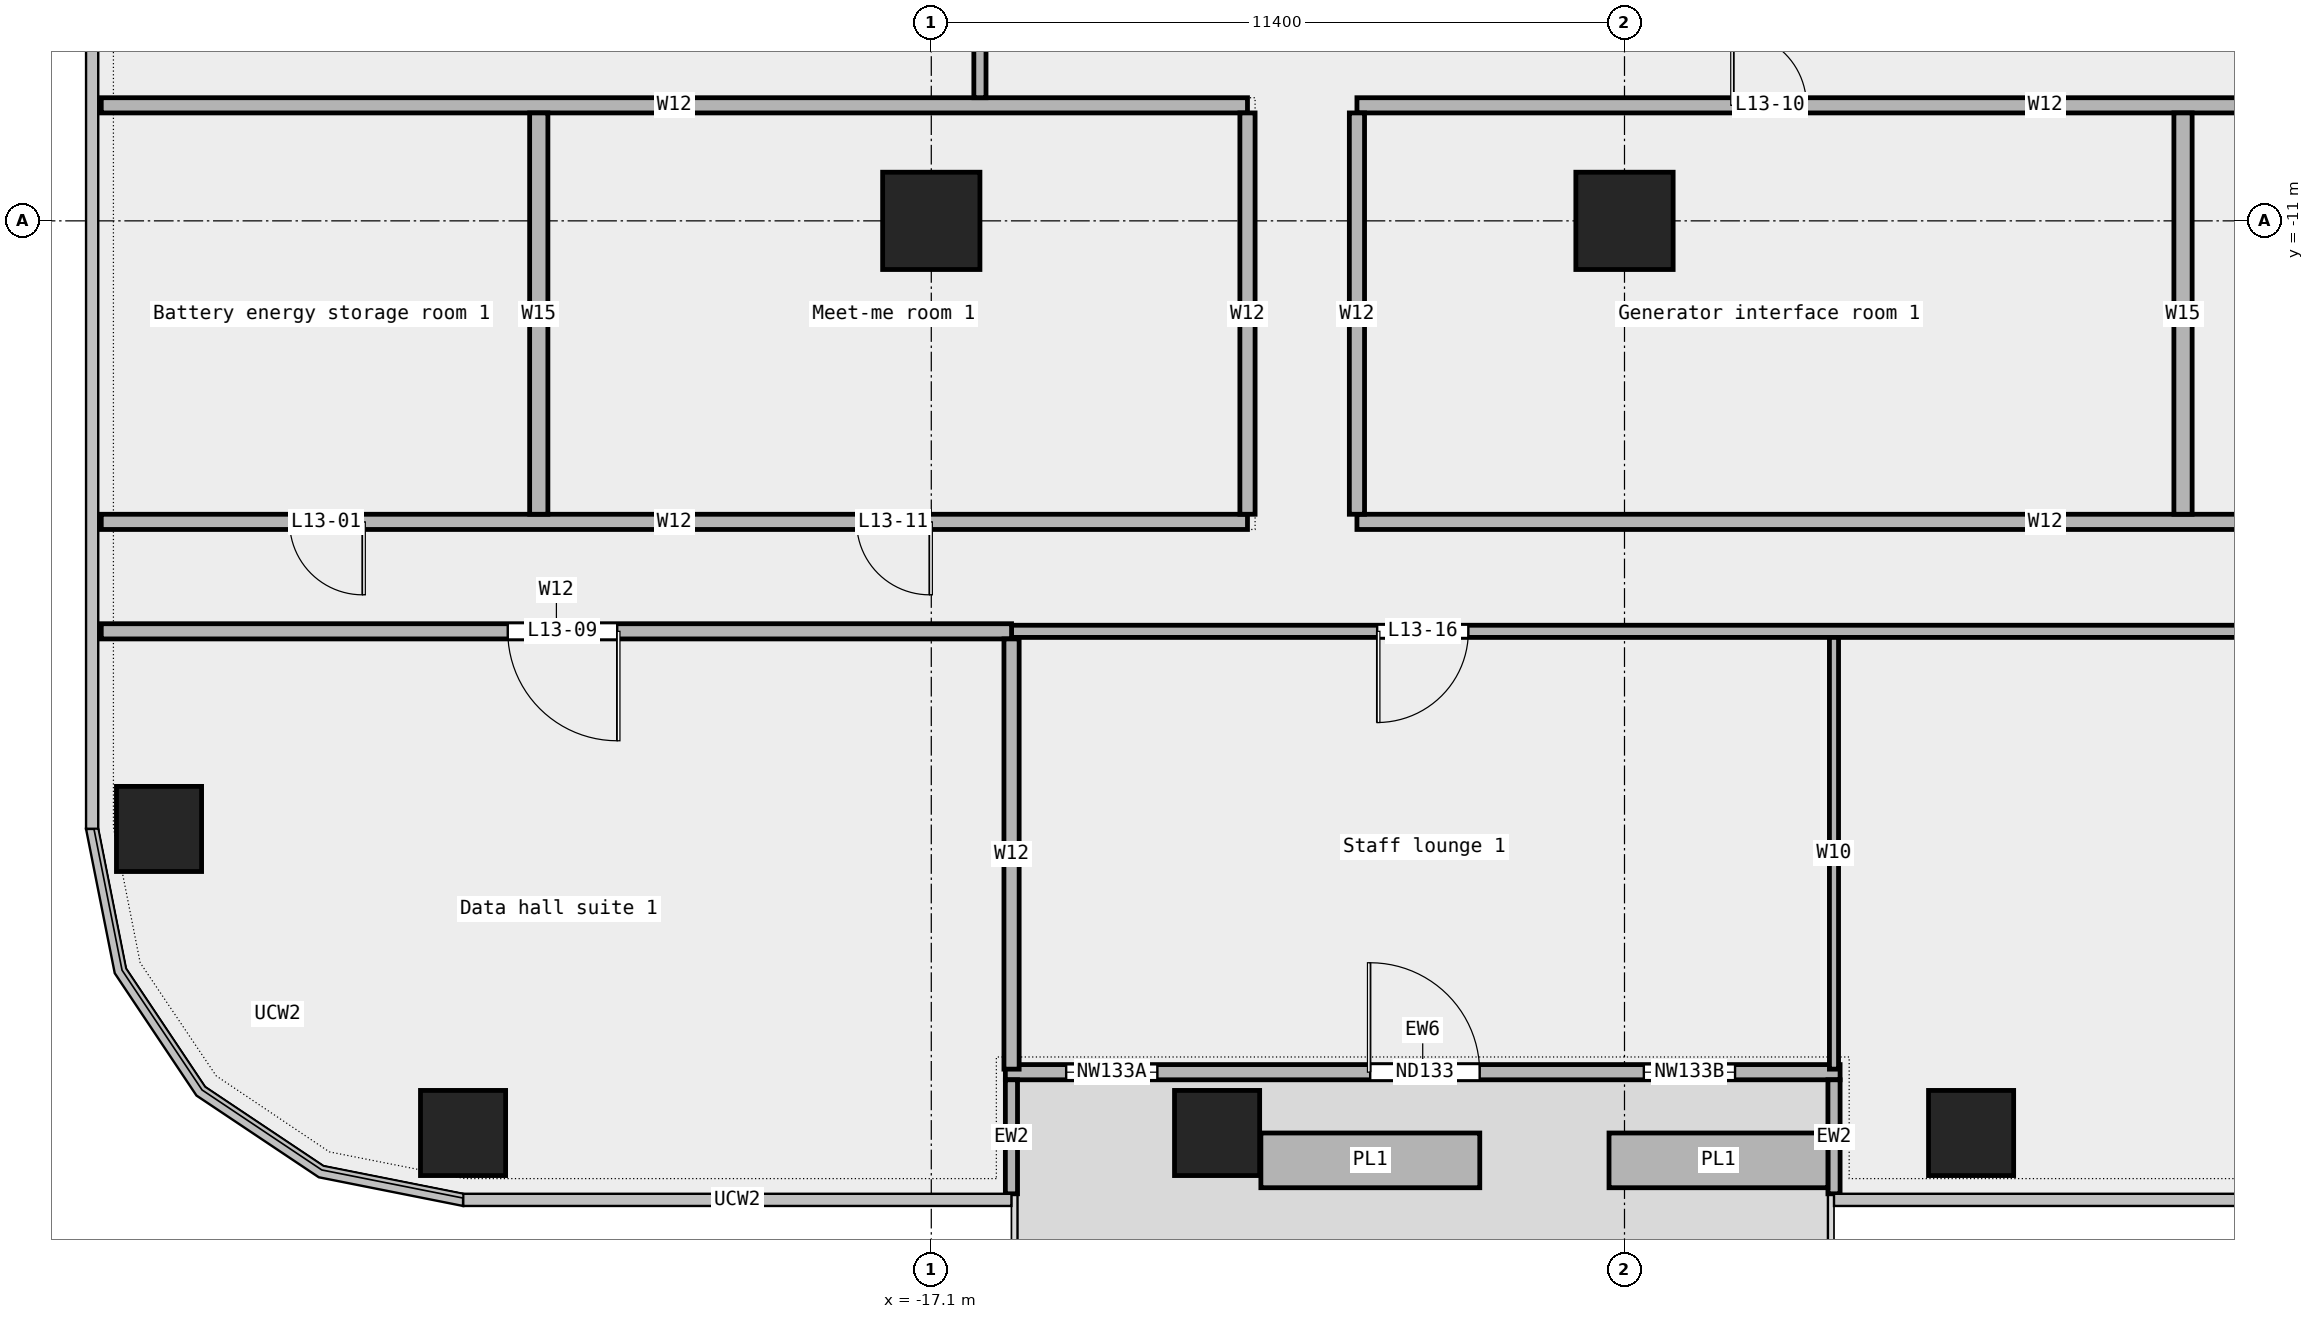
"""IFC4 building model, lengths in metres.
Left out: names, types, materials, properties, quantities, classifications, styles, units other than length and angle.
Written with IfcOpenShell. Run it as: python <this file> out.ifc"""

import sys

from ifc_helpers import new_model, si_unit, direction, frame, frame_2d, origin, origin_2d, place, context, subcontext, project, spatial, rectangle, extrude, element, fill, save


model = new_model("IFC4")
c1 = context("Model", 3, precision=1e-05, world=origin(), true_north=direction((0.0, 1.0)))
c2 = subcontext(c1, "Body", "Model", "MODEL_VIEW")
j1 = project(units=[si_unit("LENGTHUNIT", "METRE"), si_unit("PLANEANGLEUNIT", "RADIAN")], contexts=[c1])
p1 = place(None, origin())
s1 = spatial("IfcSite", under=j1, at=p1, CompositionType="ELEMENT")
p2 = place(p1, origin())
s2 = spatial("IfcBuilding", under=s1, at=p2, CompositionType="ELEMENT")
p3 = place(p2, frame((0.0, 0.0, 69.4)))
s3 = spatial("IfcBuildingStorey", under=s2, at=p3, CompositionType="ELEMENT", Elevation=69.4)
for number, where, z_axis, x_axis in (
    (1, (-24.8, -26.0, 0.0), (0.0, 0.0, 1.0), (1.0, 0.0, 0.0)),
    (2, (-12.4, -26.0, 0.0), (0.0, 0.0, 1.0), (1.0, 0.0, 0.0)),
    (3, (0.0, -26.0, 0.0), (0.0, 0.0, 1.0), (1.0, 0.0, 0.0)),
    (4, (-29.8, -21.0, 0.0), (0.0, 0.0, 1.0), (1.0, 0.0, 0.0)),
):
    element("IfcColumn", number, at=place(p3, frame(where, z_axis=z_axis, x_axis=x_axis)), inside=s3, PredefinedType="COLUMN", context=c2, shape_type="SweptSolid", body=[
        extrude(rectangle(XDim=1.4, YDim=1.4, at=origin_2d()), origin(), (0.0, 0.0, 1.0), 4.35),
    ])
for number, where, z_axis, x_axis in (
    (5, (-17.1, -11.0, 0.0), (0.0, 0.0, 1.0), (1.0, 0.0, 0.0)),
    (6, (-5.7, -11.0, 0.0), (0.0, 0.0, 1.0), (1.0, 0.0, 0.0)),
):
    element("IfcColumn", number, at=place(p3, frame(where, z_axis=z_axis, x_axis=x_axis)), inside=s3, PredefinedType="COLUMN", context=c2, shape_type="SweptSolid", body=[
        extrude(rectangle(XDim=1.6, YDim=1.6, at=origin_2d()), origin(), (0.0, 0.0, 1.0), 4.35),
    ])
p4 = place(p3, frame((-15.882, -25.0, 0.0), z_axis=(0.0, 0.0, 1.0), x_axis=(1.0, 0.0, 0.0)))
e7 = element("IfcWall", 7, at=p4, inside=s3, PredefinedType="STANDARD", context=c2, shape_type="SweptSolid", body=[
    extrude(rectangle(XDim=13.727, YDim=0.25, at=frame_2d((6.864, 0.0))), origin(), (0.0, 0.0, 1.0), 4.35),
])
p5 = place(p4, frame((1.0, 0.0, 0.45)))
e8 = element("IfcOpeningElement", 8, at=p5, cuts=e7, PredefinedType="OPENING", context=c2, shape_type="SweptSolid", body=[
    extrude(rectangle(XDim=1.5, YDim=3.0, at=frame_2d((0.75, 1.5))), frame((0.0, 0.137, 0.0), z_axis=(0.0, -1.0, 0.0), x_axis=(1.0, 0.0, 0.0)), (0.0, 0.0, 1.0), 0.274),
])
p6 = place(p4, frame((6.0, 0.0, 0.0)))
e9 = element("IfcOpeningElement", 9, at=p6, cuts=e7, PredefinedType="OPENING", context=c2, shape_type="SweptSolid", body=[
    extrude(rectangle(XDim=1.8, YDim=2.4, at=frame_2d((0.9, 1.2))), frame((0.0, 0.137, 0.0), z_axis=(0.0, -1.0, 0.0), x_axis=(1.0, 0.0, 0.0)), (0.0, 0.0, 1.0), 0.274),
])
p7 = place(p4, frame((10.5, 0.0, 0.45)))
e10 = element("IfcOpeningElement", 10, at=p7, cuts=e7, PredefinedType="OPENING", context=c2, shape_type="SweptSolid", body=[
    extrude(rectangle(XDim=1.5, YDim=3.0, at=frame_2d((0.75, 1.5))), frame((0.0, 0.137, 0.0), z_axis=(0.0, -1.0, 0.0), x_axis=(1.0, 0.0, 0.0)), (0.0, 0.0, 1.0), 0.274),
])
for number, where, z_axis, x_axis in (
    (11, (-15.782, -27.0, 0.0), (0.0, 0.0, 1.0), (0.0, 1.0, 0.0)),
    (12, (-2.255, -27.0, 0.0), (0.0, 0.0, 1.0), (0.0, 1.0, 0.0)),
):
    element("IfcWall", number, at=place(p3, frame(where, z_axis=z_axis, x_axis=x_axis)), inside=s3, PredefinedType="STANDARD", context=c2, shape_type="SweptSolid", body=[
        extrude(rectangle(XDim=1.875, YDim=0.2, at=frame_2d((0.938, 0.0))), origin(), (0.0, 0.0, 1.0), 4.35),
    ])
for number, where, z_axis, x_axis in (
    (13, (-11.68, -26.45, 0.0), (0.0, 0.0, 1.0), (1.0, 0.0, 0.0)),
    (14, (-5.955, -26.45, 0.0), (0.0, 0.0, 1.0), (1.0, 0.0, 0.0)),
):
    element("IfcWall", number, at=place(p3, frame(where, z_axis=z_axis, x_axis=x_axis)), inside=s3, PredefinedType="STANDARD", context=c2, shape_type="SweptSolid", body=[
        extrude(rectangle(XDim=3.6, YDim=0.9, at=frame_2d((1.8, 0.0))), origin(), (0.0, 0.0, 1.0), 0.7),
    ])
p8 = place(p3, frame((-15.78, -17.75, 0.0), z_axis=(0.0, 0.0, 1.0), x_axis=(1.0, 0.0, 0.0)))
e15 = element("IfcWall", 15, at=p8, inside=s3, PredefinedType="PARTITIONING", context=c2, shape_type="SweptSolid", body=[
    extrude(rectangle(XDim=46.53, YDim=0.2, at=frame_2d((23.265, 0.0))), origin(), (0.0, 0.0, 1.0), 4.35),
])
p9 = place(p8, frame((29.028, 0.0, 0.0)))
e16 = element("IfcOpeningElement", 16, at=p9, cuts=e15, PredefinedType="OPENING", context=c2, shape_type="SweptSolid", body=[
    extrude(rectangle(XDim=1.8, YDim=2.1, at=frame_2d((0.9, 1.05))), frame((0.0, 0.112, 0.0), z_axis=(0.0, -1.0, 0.0), x_axis=(1.0, 0.0, 0.0)), (0.0, 0.0, 1.0), 0.224),
])
p10 = place(p8, frame((6.012, 0.0, 0.0)))
e17 = element("IfcOpeningElement", 17, at=p10, cuts=e15, PredefinedType="OPENING", context=c2, shape_type="SweptSolid", body=[
    extrude(rectangle(XDim=1.5, YDim=2.1, at=frame_2d((0.75, 1.05))), frame((0.0, 0.112, 0.0), z_axis=(0.0, -1.0, 0.0), x_axis=(1.0, 0.0, 0.0)), (0.0, 0.0, 1.0), 0.224),
])
p11 = place(p3, frame((-30.75, -17.75, 0.0), z_axis=(0.0, 0.0, 1.0), x_axis=(1.0, 0.0, 0.0)))
e18 = element("IfcWall", 18, at=p11, inside=s3, PredefinedType="PARTITIONING", context=c2, shape_type="SweptSolid", body=[
    extrude(rectangle(XDim=14.97, YDim=0.25, at=frame_2d((7.485, 0.0))), origin(), (0.0, 0.0, 1.0), 4.35),
])
p12 = place(p11, frame((6.685, 0.0, 0.0)))
e19 = element("IfcOpeningElement", 19, at=p12, cuts=e18, PredefinedType="OPENING", context=c2, shape_type="SweptSolid", body=[
    extrude(rectangle(XDim=1.8, YDim=2.1, at=frame_2d((0.9, 1.05))), frame((0.0, 0.137, 0.0), z_axis=(0.0, -1.0, 0.0), x_axis=(1.0, 0.0, 0.0)), (0.0, 0.0, 1.0), 0.274),
])
p13 = place(p3, frame((-30.75, -15.95, 0.0), z_axis=(0.0, 0.0, 1.0), x_axis=(1.0, 0.0, 0.0)))
e20 = element("IfcWall", 20, at=p13, inside=s3, PredefinedType="PARTITIONING", context=c2, shape_type="SweptSolid", body=[
    extrude(rectangle(XDim=18.85, YDim=0.25, at=frame_2d((9.425, 0.0))), origin(), (0.0, 0.0, 1.0), 4.35),
])
p14 = place(p13, frame((3.097, 0.0, 0.0)))
e21 = element("IfcOpeningElement", 21, at=p14, cuts=e20, PredefinedType="OPENING", context=c2, shape_type="SweptSolid", body=[
    extrude(rectangle(XDim=1.2, YDim=2.1, at=frame_2d((0.6, 1.05))), frame((0.0, 0.137, 0.0), z_axis=(0.0, -1.0, 0.0), x_axis=(1.0, 0.0, 0.0)), (0.0, 0.0, 1.0), 0.274),
])
p15 = place(p13, frame((12.423, 0.0, 0.0)))
e22 = element("IfcOpeningElement", 22, at=p15, cuts=e20, PredefinedType="OPENING", context=c2, shape_type="SweptSolid", body=[
    extrude(rectangle(XDim=1.2, YDim=2.1, at=frame_2d((0.6, 1.05))), frame((0.0, 0.137, 0.0), z_axis=(0.0, -1.0, 0.0), x_axis=(1.0, 0.0, 0.0)), (0.0, 0.0, 1.0), 0.274),
])
p16 = place(p3, frame((-10.1, -15.95, 0.0), z_axis=(0.0, 0.0, 1.0), x_axis=(1.0, 0.0, 0.0)))
e23 = element("IfcWall", 23, at=p16, inside=s3, PredefinedType="PARTITIONING", context=c2, shape_type="SweptSolid", body=[
    extrude(rectangle(XDim=22.64, YDim=0.25, at=frame_2d((11.32, 0.0))), origin(), (0.0, 0.0, 1.0), 4.35),
])
p17 = place(p3, frame((-30.75, -9.1, 0.0), z_axis=(0.0, 0.0, 1.0), x_axis=(1.0, 0.0, 0.0)))
e24 = element("IfcWall", 24, at=p17, inside=s3, PredefinedType="PARTITIONING", context=c2, shape_type="SweptSolid", body=[
    extrude(rectangle(XDim=18.85, YDim=0.25, at=frame_2d((9.425, 0.0))), origin(), (0.0, 0.0, 1.0), 4.35),
])
p18 = place(p3, frame((-10.1, -9.1, 0.0), z_axis=(0.0, 0.0, 1.0), x_axis=(1.0, 0.0, 0.0)))
e25 = element("IfcWall", 25, at=p18, inside=s3, PredefinedType="PARTITIONING", context=c2, shape_type="SweptSolid", body=[
    extrude(rectangle(XDim=22.64, YDim=0.25, at=frame_2d((11.32, 0.0))), origin(), (0.0, 0.0, 1.0), 4.35),
])
p19 = place(p18, frame((17.512, 0.0, 0.0)))
e26 = element("IfcOpeningElement", 26, at=p19, cuts=e25, PredefinedType="OPENING", context=c2, shape_type="SweptSolid", body=[
    extrude(rectangle(XDim=1.2, YDim=2.1, at=frame_2d((0.6, 1.05))), frame((0.0, 0.137, 0.0), z_axis=(0.0, -1.0, 0.0), x_axis=(1.0, 0.0, 0.0)), (0.0, 0.0, 1.0), 0.274),
])
p20 = place(p18, frame((6.192, 0.0, 0.0)))
e27 = element("IfcOpeningElement", 27, at=p20, cuts=e25, PredefinedType="OPENING", context=c2, shape_type="SweptSolid", body=[
    extrude(rectangle(XDim=1.2, YDim=2.1, at=frame_2d((0.6, 1.05))), frame((0.0, 0.137, 0.0), z_axis=(0.0, -1.0, 0.0), x_axis=(1.0, 0.0, 0.0)), (0.0, 0.0, 1.0), 0.274),
])
p21 = place(p3, frame((-23.555, -15.825, 0.0), z_axis=(0.0, 0.0, 1.0), x_axis=(0.0, 1.0, 0.0)))
e28 = element("IfcWall", 28, at=p21, inside=s3, PredefinedType="PARTITIONING", context=c2, shape_type="SweptSolid", body=[
    extrude(rectangle(XDim=6.6, YDim=0.3, at=frame_2d((3.3, 0.0))), origin(), (0.0, 0.0, 1.0), 4.35),
])
p22 = place(p3, frame((-16.3, -8.975, 0.0), z_axis=(0.0, 0.0, 1.0), x_axis=(0.0, 1.0, 0.0)))
e29 = element("IfcWall", 29, at=p22, inside=s3, PredefinedType="PARTITIONING", context=c2, shape_type="SweptSolid", body=[
    extrude(rectangle(XDim=6.75, YDim=0.2, at=frame_2d((3.375, 0.0))), origin(), (0.0, 0.0, 1.0), 4.35),
])
p23 = place(p22, frame((2.625, 0.0, 0.0)))
e30 = element("IfcOpeningElement", 30, at=p23, cuts=e29, PredefinedType="OPENING", context=c2, shape_type="SweptSolid", body=[
    extrude(rectangle(XDim=1.5, YDim=2.1, at=frame_2d((0.75, 1.05))), frame((0.0, 0.112, 0.0), z_axis=(0.0, -1.0, 0.0), x_axis=(1.0, 0.0, 0.0)), (0.0, 0.0, 1.0), 0.224),
])
p24 = place(p3, frame((-15.78, -24.95, 0.0), z_axis=(0.0, 0.0, 1.0), x_axis=(0.0, 1.0, 0.0)))
e31 = element("IfcWall", 31, at=p24, inside=s3, PredefinedType="PARTITIONING", context=c2, shape_type="SweptSolid", body=[
    extrude(rectangle(XDim=7.075, YDim=0.25, at=frame_2d((3.538, 0.0))), origin(), (0.0, 0.0, 1.0), 4.35),
])
for number, where, z_axis, x_axis in (
    (32, (-11.9, -15.825, 0.0), (0.0, 0.0, 1.0), (0.0, 1.0, 0.0)),
    (33, (-10.1, -15.825, 0.0), (0.0, 0.0, 1.0), (0.0, 1.0, 0.0)),
):
    element("IfcWall", number, at=place(p3, frame(where, z_axis=z_axis, x_axis=x_axis)), inside=s3, PredefinedType="PARTITIONING", context=c2, shape_type="SweptSolid", body=[
        extrude(rectangle(XDim=6.6, YDim=0.25, at=frame_2d((3.3, 0.0))), origin(), (0.0, 0.0, 1.0), 4.35),
    ])
p25 = place(p3, frame((-2.255, -24.95, 0.0), z_axis=(0.0, 0.0, 1.0), x_axis=(0.0, 1.0, 0.0)))
e34 = element("IfcWall", 34, at=p25, inside=s3, PredefinedType="PARTITIONING", context=c2, shape_type="SweptSolid", body=[
    extrude(rectangle(XDim=7.1, YDim=0.15, at=frame_2d((3.55, 0.0))), origin(), (0.0, 0.0, 1.0), 4.35),
])
p26 = place(p3, frame((3.485, -15.825, 0.0), z_axis=(0.0, 0.0, 1.0), x_axis=(0.0, 1.0, 0.0)))
e35 = element("IfcWall", 35, at=p26, inside=s3, PredefinedType="PARTITIONING", context=c2, shape_type="SweptSolid", body=[
    extrude(rectangle(XDim=6.6, YDim=0.3, at=frame_2d((3.3, 0.0))), origin(), (0.0, 0.0, 1.0), 4.35),
])
p27 = place(p5, origin())
e36 = element("IfcWindow", 36, at=p27, inside=s3, PartitioningType="SINGLE_PANEL", PredefinedType="WINDOW", context=c2, shape_type="SweptSolid", body=[
    extrude(rectangle(XDim=1.5, YDim=3.0, at=frame_2d((0.75, 1.5))), frame((0.0, 0.03, 0.0), z_axis=(0.0, -1.0, 0.0), x_axis=(1.0, 0.0, 0.0)), (0.0, 0.0, 1.0), 0.06),
])
fill(e8, e36)
p28 = place(p6, origin())
e37 = element("IfcDoor", 37, at=p28, inside=s3, OperationType="DOUBLE_DOOR_SINGLE_SWING", PredefinedType="DOOR", context=c2, shape_type="SweptSolid", body=[
    extrude(rectangle(XDim=1.8, YDim=2.4, at=frame_2d((0.9, 1.2))), frame((0.0, 0.025, 0.0), z_axis=(0.0, -1.0, 0.0), x_axis=(1.0, 0.0, 0.0)), (0.0, 0.0, 1.0), 0.05),
])
fill(e9, e37)
p29 = place(p7, origin())
e38 = element("IfcWindow", 38, at=p29, inside=s3, PartitioningType="SINGLE_PANEL", PredefinedType="WINDOW", context=c2, shape_type="SweptSolid", body=[
    extrude(rectangle(XDim=1.5, YDim=3.0, at=frame_2d((0.75, 1.5))), frame((0.0, 0.03, 0.0), z_axis=(0.0, -1.0, 0.0), x_axis=(1.0, 0.0, 0.0)), (0.0, 0.0, 1.0), 0.06),
])
fill(e10, e38)
p30 = place(p14, origin())
e39 = element("IfcDoor", 39, at=p30, inside=s3, OperationType="SINGLE_SWING_LEFT", PredefinedType="DOOR", context=c2, shape_type="SweptSolid", body=[
    extrude(rectangle(XDim=1.2, YDim=2.1, at=frame_2d((0.6, 1.05))), frame((0.0, 0.025, 0.0), z_axis=(0.0, -1.0, 0.0), x_axis=(1.0, 0.0, 0.0)), (0.0, 0.0, 1.0), 0.05),
])
fill(e21, e39)
p31 = place(p12, origin())
e40 = element("IfcDoor", 40, at=p31, inside=s3, OperationType="DOUBLE_DOOR_SINGLE_SWING", PredefinedType="DOOR", context=c2, shape_type="SweptSolid", body=[
    extrude(rectangle(XDim=1.8, YDim=2.1, at=frame_2d((0.9, 1.05))), frame((0.0, 0.025, 0.0), z_axis=(0.0, -1.0, 0.0), x_axis=(1.0, 0.0, 0.0)), (0.0, 0.0, 1.0), 0.05),
])
fill(e19, e40)
p32 = place(p20, origin())
e41 = element("IfcDoor", 41, at=p32, inside=s3, OperationType="SINGLE_SWING_LEFT", PredefinedType="DOOR", context=c2, shape_type="SweptSolid", body=[
    extrude(rectangle(XDim=1.2, YDim=2.1, at=frame_2d((0.6, 1.05))), frame((0.0, 0.025, 0.0), z_axis=(0.0, -1.0, 0.0), x_axis=(1.0, 0.0, 0.0)), (0.0, 0.0, 1.0), 0.05),
])
fill(e27, e41)
p33 = place(p15, origin())
e42 = element("IfcDoor", 42, at=p33, inside=s3, OperationType="SINGLE_SWING_LEFT", PredefinedType="DOOR", context=c2, shape_type="SweptSolid", body=[
    extrude(rectangle(XDim=1.2, YDim=2.1, at=frame_2d((0.6, 1.05))), frame((0.0, 0.025, 0.0), z_axis=(0.0, -1.0, 0.0), x_axis=(1.0, 0.0, 0.0)), (0.0, 0.0, 1.0), 0.05),
])
fill(e22, e42)
p34 = place(p10, origin())
e43 = element("IfcDoor", 43, at=p34, inside=s3, OperationType="DOUBLE_DOOR_SINGLE_SWING", PredefinedType="DOOR", context=c2, shape_type="SweptSolid", body=[
    extrude(rectangle(XDim=1.5, YDim=2.1, at=frame_2d((0.75, 1.05))), frame((0.0, 0.025, 0.0), z_axis=(0.0, -1.0, 0.0), x_axis=(1.0, 0.0, 0.0)), (0.0, 0.0, 1.0), 0.05),
])
fill(e17, e43)
save(model, sys.argv[1])
